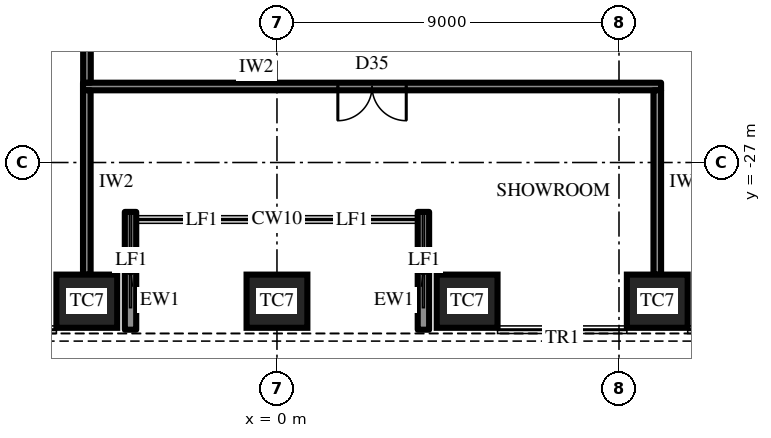
"""IFC4 building model, lengths in metres.
Left out: names, types, materials, properties, quantities, classifications, styles, units other than length and angle.
Written with IfcOpenShell. Run it as: python <this file> out.ifc"""

import sys

from ifc_helpers import new_model, si_unit, direction, frame, frame_2d, origin, origin_2d, place, context, subcontext, project, spatial, rectangle, extrude, element, fill, save


model = new_model("IFC4")
c1 = context("Model", 3, precision=1e-05, world=origin(), true_north=direction((0.0, 1.0)))
c2 = subcontext(c1, "Body", "Model", "MODEL_VIEW")
j1 = project(units=[si_unit("LENGTHUNIT", "METRE"), si_unit("PLANEANGLEUNIT", "RADIAN")], contexts=[c1])
p1 = place(None, origin())
s1 = spatial("IfcSite", under=j1, at=p1, CompositionType="ELEMENT")
p2 = place(p1, origin())
s2 = spatial("IfcBuilding", under=s1, at=p2, CompositionType="ELEMENT")
p3 = place(p2, frame((0.0, 0.0, 174.1)))
s3 = spatial("IfcBuildingStorey", under=s2, at=p3, CompositionType="ELEMENT", Elevation=174.1)
for number, where, z_axis, x_axis in (
    (1, (-5.004, -30.65, 0.0), (0.0, 0.0, 1.0), (1.0, 0.0, 0.0)),
    (2, (0.0, -30.65, 0.0), (0.0, 0.0, 1.0), (1.0, 0.0, 0.0)),
    (3, (5.004, -30.65, 0.0), (0.0, 0.0, 1.0), (1.0, 0.0, 0.0)),
    (4, (10.007, -30.65, 0.0), (0.0, 0.0, 1.0), (1.0, 0.0, 0.0)),
):
    element("IfcColumn", number, at=place(p3, frame(where, z_axis=z_axis, x_axis=x_axis)), inside=s3, PredefinedType="COLUMN", context=c2, shape_type="SweptSolid", body=[
        extrude(rectangle(XDim=1.6, YDim=1.4, at=origin_2d()), origin(), (0.0, 0.0, 1.0), 4.2),
    ])
for number, where, z_axis, x_axis in (
    (5, (-3.854, -31.4, 0.0), (0.0, 0.0, 1.0), (0.0, 1.0, 0.0)),
    (6, (3.854, -31.4, 0.0), (0.0, 0.0, 1.0), (0.0, 1.0, 0.0)),
):
    element("IfcWall", number, at=place(p3, frame(where, z_axis=z_axis, x_axis=x_axis)), inside=s3, PredefinedType="SOLIDWALL", context=c2, shape_type="SweptSolid", body=[
        extrude(rectangle(XDim=3.1, YDim=0.3, at=frame_2d((1.55, 0.0))), origin(), (0.0, 0.0, 1.0), 2.75),
    ])
p4 = place(p3, frame((-5.104, -25.0, 0.0), z_axis=(0.0, 0.0, 1.0), x_axis=(1.0, 0.0, 0.0)))
e7 = element("IfcWall", 7, at=p4, inside=s3, PredefinedType="PARTITIONING", context=c2, shape_type="SweptSolid", body=[
    extrude(rectangle(XDim=15.211, YDim=0.2, at=frame_2d((7.605, 0.0))), origin(), (0.0, 0.0, 1.0), 4.0),
])
p5 = place(p4, frame((6.706, 0.0, 0.0)))
e8 = element("IfcOpeningElement", 8, at=p5, cuts=e7, PredefinedType="OPENING", context=c2, shape_type="SweptSolid", body=[
    extrude(rectangle(XDim=1.8, YDim=2.4, at=frame_2d((0.9, 1.2))), frame((0.0, 0.11, 0.0), z_axis=(0.0, -1.0, 0.0), x_axis=(1.0, 0.0, 0.0)), (0.0, 0.0, 1.0), 0.22),
])
for number, where, z_axis, x_axis in (
    (9, (-5.004, -25.1, 0.0), (0.0, 0.0, 1.0), (0.0, -1.0, 0.0)),
    (10, (10.007, -25.1, 0.0), (0.0, 0.0, 1.0), (0.0, -1.0, 0.0)),
):
    element("IfcWall", number, at=place(p3, frame(where, z_axis=z_axis, x_axis=x_axis)), inside=s3, PredefinedType="PARTITIONING", context=c2, shape_type="SweptSolid", body=[
        extrude(rectangle(XDim=4.85, YDim=0.2, at=frame_2d((2.425, 0.0))), origin(), (0.0, 0.0, 1.0), 2.992),
    ])
p6 = place(p3, frame((-5.0, -18.7, 0.0), z_axis=(0.0, 0.0, 1.0), x_axis=(0.0, -1.0, 0.0)))
e11 = element("IfcWall", 11, at=p6, inside=s3, PredefinedType="PARTITIONING", context=c2, shape_type="SweptSolid", body=[
    extrude(rectangle(XDim=6.2, YDim=0.2, at=frame_2d((3.1, 0.0))), origin(), (0.0, 0.0, 1.0), 2.992),
])
p7 = place(p5, frame((1.8, 0.0, 0.0), z_axis=(0.0, 0.0, 1.0), x_axis=(-1.0, 0.0, 0.0)))
e12 = element("IfcDoor", 12, at=p7, inside=s3, OperationType="DOUBLE_DOOR_SINGLE_SWING", PredefinedType="DOOR", context=c2, shape_type="SweptSolid", body=[
    extrude(rectangle(XDim=1.8, YDim=2.4, at=frame_2d((0.9, 1.2))), frame((0.0, 0.025, 0.0), z_axis=(0.0, -1.0, 0.0), x_axis=(1.0, 0.0, 0.0)), (0.0, 0.0, 1.0), 0.05),
])
fill(e8, e12)
save(model, sys.argv[1])
